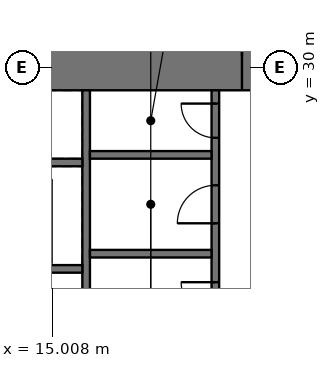
"""IFC4 building model, lengths in metres.
Left out: names, types, materials, properties, quantities, classifications, styles, units other than length and angle.
Written with IfcOpenShell. Run it as: python <this file> out.ifc"""

import sys

from ifc_helpers import new_model, si_unit, direction, frame, frame_2d, origin, place, context, subcontext, project, spatial, rectangle, extrude, element, fill, save


model = new_model("IFC4")
c1 = context("Model", 3, precision=1e-05, world=origin(), true_north=direction((0.0, 1.0)))
c2 = subcontext(c1, "Body", "Model", "MODEL_VIEW")
j1 = project(units=[si_unit("LENGTHUNIT", "METRE"), si_unit("PLANEANGLEUNIT", "RADIAN")], contexts=[c1])
p1 = place(None, origin())
s1 = spatial("IfcSite", under=j1, at=p1, CompositionType="ELEMENT")
p2 = place(p1, origin())
s2 = spatial("IfcBuilding", under=s1, at=p2, CompositionType="ELEMENT")
p3 = place(p2, frame((0.0, 0.0, 38.5)))
s3 = spatial("IfcBuildingStorey", under=s2, at=p3, CompositionType="ELEMENT", Elevation=38.5)
p4 = place(p3, frame((10.8, 30.3, -0.05), z_axis=(0.0, 0.0, 1.0), x_axis=(1.0, 0.0, 0.0)))
e1 = element("IfcWall", 1, at=p4, inside=s3, PredefinedType="SHEAR", context=c2, shape_type="SweptSolid", body=[
    extrude(rectangle(XDim=20.4, YDim=1.8, at=frame_2d((10.2, 0.0))), origin(), (0.0, 0.0, 1.0), 4.0),
])
p5 = place(p4, frame((9.2, 0.0, 0.05)))
e2 = element("IfcOpeningElement", 2, at=p5, cuts=e1, PredefinedType="OPENING", context=c2, shape_type="SweptSolid", body=[
    extrude(rectangle(XDim=2.0, YDim=2.2, at=frame_2d((1.0, 1.1))), frame((0.0, 0.91, 0.0), z_axis=(0.0, -1.0, 0.0), x_axis=(1.0, 0.0, 0.0)), (0.0, 0.0, 1.0), 1.82),
])
p6 = place(p3, frame((15.9, 12.6, -0.05), z_axis=(0.0, 0.0, 1.0), x_axis=(0.0, 1.0, 0.0)))
e3 = element("IfcWall", 3, at=p6, inside=s3, PredefinedType="SHEAR", context=c2, shape_type="SweptSolid", body=[
    extrude(rectangle(XDim=16.8, YDim=0.2, at=frame_2d((8.4, 0.0))), origin(), (0.0, 0.0, 1.0), 4.0),
])
p7 = place(p6, frame((8.9, 0.0, 0.05)))
e4 = element("IfcOpeningElement", 4, at=p7, cuts=e3, PredefinedType="OPENING", context=c2, shape_type="SweptSolid", body=[
    extrude(rectangle(XDim=1.0, YDim=2.2, at=frame_2d((0.5, 1.1))), frame((0.0, 0.11, 0.0), z_axis=(0.0, -1.0, 0.0), x_axis=(1.0, 0.0, 0.0)), (0.0, 0.0, 1.0), 0.22),
])
p8 = place(p3, frame((19.3, 12.6, -0.05), z_axis=(0.0, 0.0, 1.0), x_axis=(0.0, 1.0, 0.0)))
e5 = element("IfcWall", 5, at=p8, inside=s3, PredefinedType="SHEAR", context=c2, shape_type="SweptSolid", body=[
    extrude(rectangle(XDim=16.8, YDim=0.2, at=frame_2d((8.4, 0.0))), origin(), (0.0, 0.0, 1.0), 4.0),
])
p9 = place(p8, frame((8.7, 0.0, 0.05)))
e6 = element("IfcOpeningElement", 6, at=p9, cuts=e5, PredefinedType="OPENING", context=c2, shape_type="SweptSolid", body=[
    extrude(rectangle(XDim=1.0, YDim=2.2, at=frame_2d((0.5, 1.1))), frame((0.0, 0.11, 0.0), z_axis=(0.0, -1.0, 0.0), x_axis=(1.0, 0.0, 0.0)), (0.0, 0.0, 1.0), 0.22),
])
p10 = place(p8, frame((10.85, 0.0, 0.05)))
e7 = element("IfcOpeningElement", 7, at=p10, cuts=e5, PredefinedType="OPENING", context=c2, shape_type="SweptSolid", body=[
    extrude(rectangle(XDim=0.9, YDim=2.2, at=frame_2d((0.45, 1.1))), frame((0.0, 0.11, 0.0), z_axis=(0.0, -1.0, 0.0), x_axis=(1.0, 0.0, 0.0)), (0.0, 0.0, 1.0), 0.22),
])
p11 = place(p8, frame((13.3, 0.0, 0.05)))
e8 = element("IfcOpeningElement", 8, at=p11, cuts=e5, PredefinedType="OPENING", context=c2, shape_type="SweptSolid", body=[
    extrude(rectangle(XDim=1.0, YDim=2.2, at=frame_2d((0.5, 1.1))), frame((0.0, 0.11, 0.0), z_axis=(0.0, -1.0, 0.0), x_axis=(1.0, 0.0, 0.0)), (0.0, 0.0, 1.0), 0.22),
])
p12 = place(p8, frame((15.55, 0.0, 0.05)))
e9 = element("IfcOpeningElement", 9, at=p12, cuts=e5, PredefinedType="OPENING", context=c2, shape_type="SweptSolid", body=[
    extrude(rectangle(XDim=0.9, YDim=2.2, at=frame_2d((0.45, 1.1))), frame((0.0, 0.11, 0.0), z_axis=(0.0, -1.0, 0.0), x_axis=(1.0, 0.0, 0.0)), (0.0, 0.0, 1.0), 0.22),
])
p13 = place(p8, frame((0.75, 0.0, 0.05)))
e10 = element("IfcOpeningElement", 10, at=p13, cuts=e5, PredefinedType="OPENING", context=c2, shape_type="SweptSolid", body=[
    extrude(rectangle(XDim=1.1, YDim=2.2, at=frame_2d((0.55, 1.1))), frame((0.0, 0.11, 0.0), z_axis=(0.0, -1.0, 0.0), x_axis=(1.0, 0.0, 0.0)), (0.0, 0.0, 1.0), 0.22),
])
p14 = place(p8, frame((3.55, 0.0, 0.05)))
e11 = element("IfcOpeningElement", 11, at=p14, cuts=e5, PredefinedType="OPENING", context=c2, shape_type="SweptSolid", body=[
    extrude(rectangle(XDim=1.1, YDim=2.2, at=frame_2d((0.55, 1.1))), frame((0.0, 0.11, 0.0), z_axis=(0.0, -1.0, 0.0), x_axis=(1.0, 0.0, 0.0)), (0.0, 0.0, 1.0), 0.22),
])
p15 = place(p8, frame((6.35, 0.0, 0.05)))
e12 = element("IfcOpeningElement", 12, at=p15, cuts=e5, PredefinedType="OPENING", context=c2, shape_type="SweptSolid", body=[
    extrude(rectangle(XDim=1.1, YDim=2.2, at=frame_2d((0.55, 1.1))), frame((0.0, 0.11, 0.0), z_axis=(0.0, -1.0, 0.0), x_axis=(1.0, 0.0, 0.0)), (0.0, 0.0, 1.0), 0.22),
])
p16 = place(p3, frame((12.6, 24.7, -0.05), z_axis=(0.0, 0.0, 1.0), x_axis=(1.0, 0.0, 0.0)))
e13 = element("IfcWall", 13, at=p16, inside=s3, PredefinedType="SHEAR", context=c2, shape_type="SweptSolid", body=[
    extrude(rectangle(XDim=3.2, YDim=0.2, at=frame_2d((1.6, 0.0))), origin(), (0.0, 0.0, 1.0), 4.0),
])
p17 = place(p16, frame((1.0, 0.0, 0.05)))
e14 = element("IfcOpeningElement", 14, at=p17, cuts=e13, PredefinedType="OPENING", context=c2, shape_type="SweptSolid", body=[
    extrude(rectangle(XDim=1.2, YDim=2.2, at=frame_2d((0.6, 1.1))), frame((0.0, 0.11, 0.0), z_axis=(0.0, -1.0, 0.0), x_axis=(1.0, 0.0, 0.0)), (0.0, 0.0, 1.0), 0.22),
])
for number, where, z_axis, x_axis in (
    (15, (12.6, 27.5, -0.05), (0.0, 0.0, 1.0), (1.0, 0.0, 0.0)),
    (16, (16.0, 25.1, -0.05), (0.0, 0.0, 1.0), (1.0, 0.0, 0.0)),
    (17, (16.0, 27.7, -0.05), (0.0, 0.0, 1.0), (1.0, 0.0, 0.0)),
):
    element("IfcWall", number, at=place(p3, frame(where, z_axis=z_axis, x_axis=x_axis)), inside=s3, PredefinedType="SHEAR", context=c2, shape_type="SweptSolid", body=[
        extrude(rectangle(XDim=3.2, YDim=0.2, at=frame_2d((1.6, 0.0))), origin(), (0.0, 0.0, 1.0), 4.0),
    ])
p18 = place(p5, origin())
e18 = element("IfcDoor", 18, at=p18, inside=s3, OperationType="DOUBLE_DOOR_SINGLE_SWING", PredefinedType="DOOR", context=c2, shape_type="SweptSolid", body=[
    extrude(rectangle(XDim=2.0, YDim=2.2, at=frame_2d((1.0, 1.1))), frame((0.0, 0.025, 0.0), z_axis=(0.0, -1.0, 0.0), x_axis=(1.0, 0.0, 0.0)), (0.0, 0.0, 1.0), 0.05),
])
fill(e2, e18)
p19 = place(p10, origin())
e19 = element("IfcDoor", 19, at=p19, inside=s3, OperationType="SINGLE_SWING_RIGHT", PredefinedType="DOOR", context=c2, shape_type="SweptSolid", body=[
    extrude(rectangle(XDim=0.9, YDim=2.2, at=frame_2d((0.45, 1.1))), frame((0.0, 0.025, 0.0), z_axis=(0.0, -1.0, 0.0), x_axis=(1.0, 0.0, 0.0)), (0.0, 0.0, 1.0), 0.05),
])
fill(e7, e19)
p20 = place(p11, origin())
e20 = element("IfcDoor", 20, at=p20, inside=s3, OperationType="SINGLE_SWING_LEFT", PredefinedType="DOOR", context=c2, shape_type="SweptSolid", body=[
    extrude(rectangle(XDim=1.0, YDim=2.2, at=frame_2d((0.5, 1.1))), frame((0.0, 0.025, 0.0), z_axis=(0.0, -1.0, 0.0), x_axis=(1.0, 0.0, 0.0)), (0.0, 0.0, 1.0), 0.05),
])
fill(e8, e20)
p21 = place(p12, origin())
e21 = element("IfcDoor", 21, at=p21, inside=s3, OperationType="SINGLE_SWING_RIGHT", PredefinedType="DOOR", context=c2, shape_type="SweptSolid", body=[
    extrude(rectangle(XDim=0.9, YDim=2.2, at=frame_2d((0.45, 1.1))), frame((0.0, 0.025, 0.0), z_axis=(0.0, -1.0, 0.0), x_axis=(1.0, 0.0, 0.0)), (0.0, 0.0, 1.0), 0.05),
])
fill(e9, e21)
save(model, sys.argv[1])
